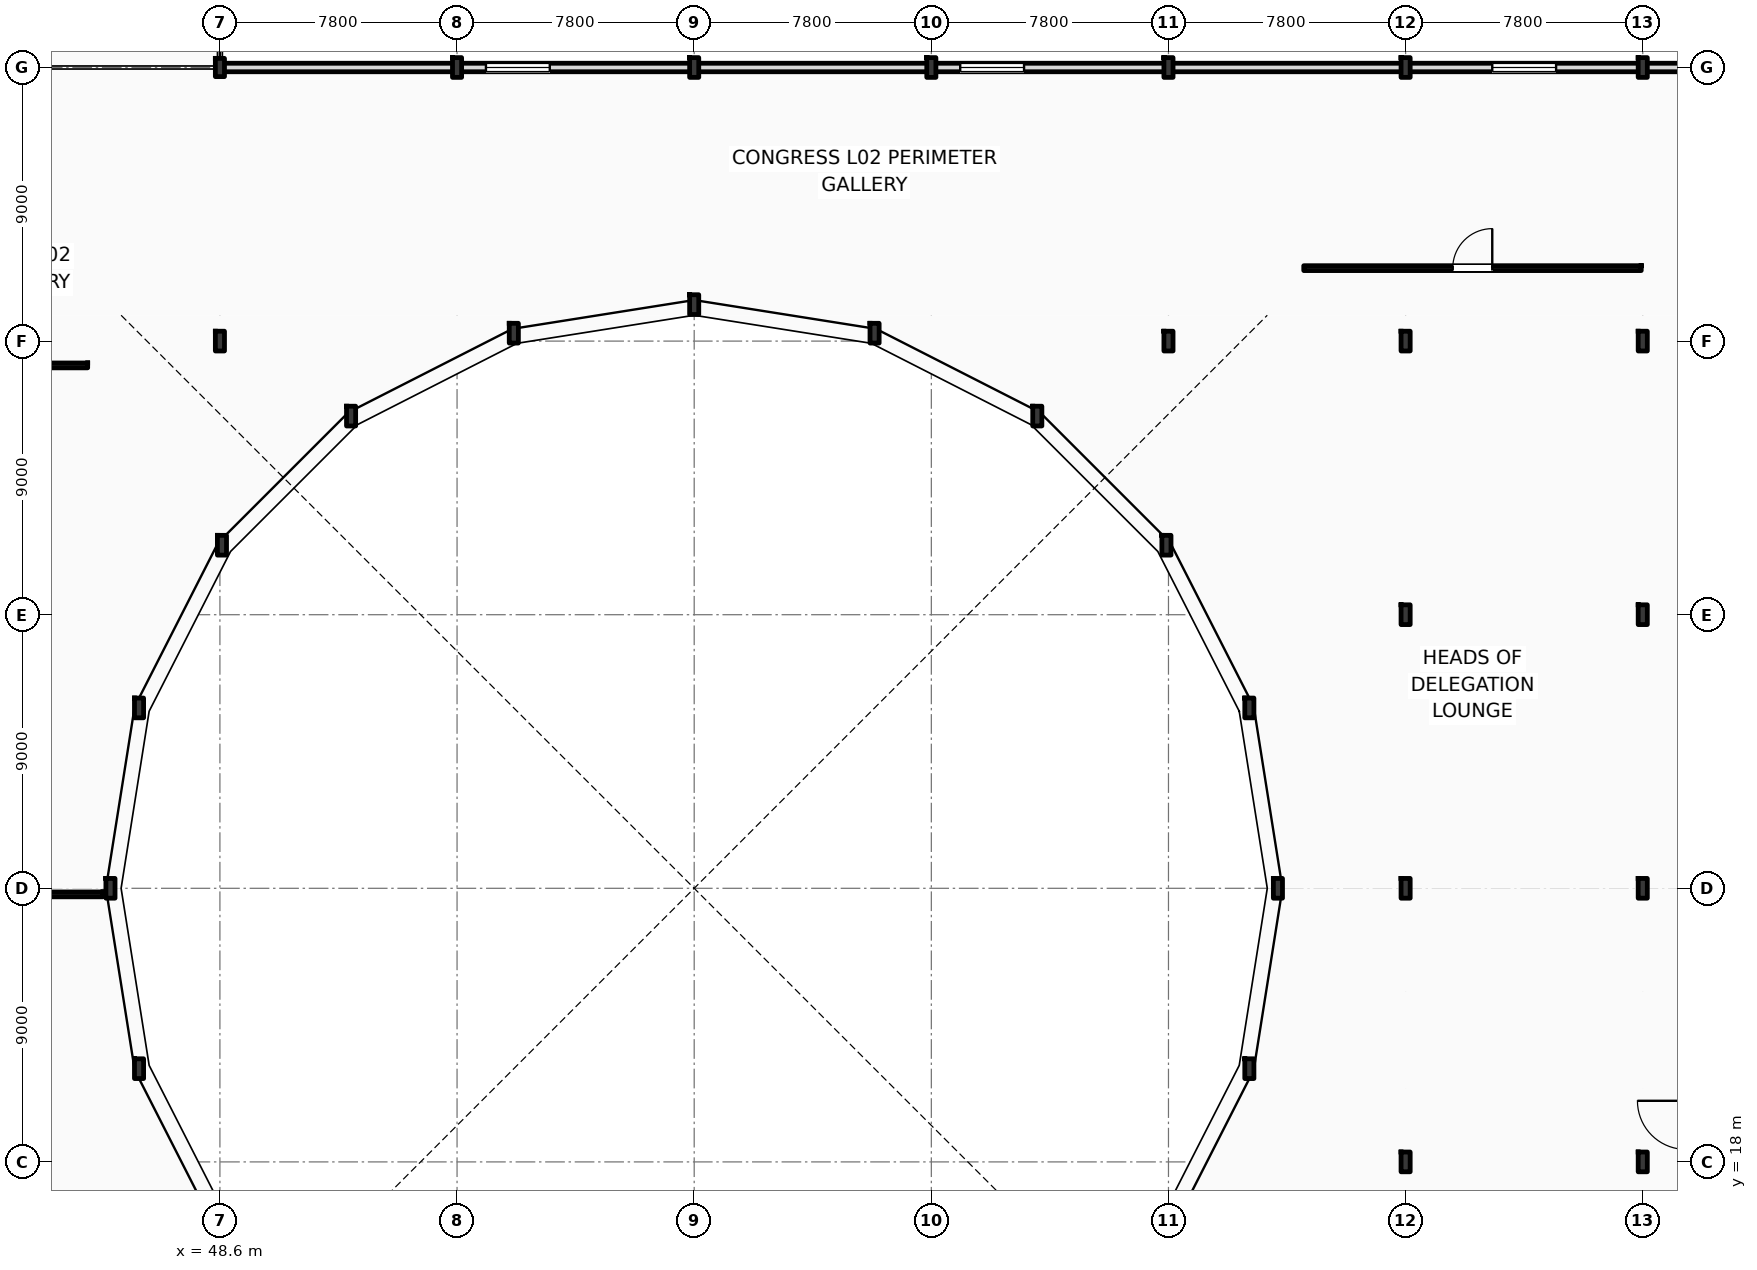
"""IFC4 building model, lengths in metres.
Left out: names, types, materials, properties, quantities, classifications, styles, units other than length and angle.
Written with IfcOpenShell. Run it as: python <this file> out.ifc"""

import sys

from ifc_helpers import new_model, si_unit, direction, frame, frame_2d, origin, origin_2d, place, context, subcontext, project, spatial, rectangle, i_section, extrude, element, fill, save


model = new_model("IFC4")
c1 = context("Model", 3, precision=1e-05, world=origin(), true_north=direction((0.0, 1.0)))
c2 = subcontext(c1, "Body", "Model", "MODEL_VIEW")
j1 = project(units=[si_unit("LENGTHUNIT", "METRE"), si_unit("PLANEANGLEUNIT", "RADIAN")], contexts=[c1])
p1 = place(None, origin())
s1 = spatial("IfcSite", under=j1, at=p1, CompositionType="ELEMENT")
p2 = place(p1, origin())
s2 = spatial("IfcBuilding", under=s1, at=p2, CompositionType="ELEMENT")
p3 = place(p2, frame((0.0, 0.0, 11.4)))
s3 = spatial("IfcBuildingStorey", under=s2, at=p3, CompositionType="ELEMENT", Elevation=11.4)
p4 = place(p3, frame((48.6, 54.0, 0.0), z_axis=(0.0, 0.0, 1.0), x_axis=(1.0, 0.0, 0.0)))
e1 = element("IfcColumn", 1, at=p4, inside=s3, PredefinedType="COLUMN", context=c2, shape_type="SweptSolid", body=[
    extrude(i_section(OverallWidth=0.3, OverallDepth=0.6, WebThickness=0.015, FlangeThickness=0.03, FilletRadius=0.027, at=origin_2d()), origin(), (0.0, 0.0, 1.0), 4.8),
])
for number, where, z_axis, x_axis in (
    (2, (48.6, 45.0, 0.0), (0.0, 0.0, 1.0), (1.0, 0.0, 0.0)),
    (3, (56.4, 54.0, 0.0), (0.0, 0.0, 1.0), (1.0, 0.0, 0.0)),
    (4, (64.2, 54.0, 0.0), (0.0, 0.0, 1.0), (1.0, 0.0, 0.0)),
    (5, (72.0, 54.0, 0.0), (0.0, 0.0, 1.0), (1.0, 0.0, 0.0)),
    (6, (79.8, 45.0, 0.0), (0.0, 0.0, 1.0), (1.0, 0.0, 0.0)),
    (7, (79.8, 54.0, 0.0), (0.0, 0.0, 1.0), (1.0, 0.0, 0.0)),
    (8, (87.6, 18.0, 0.0), (0.0, 0.0, 1.0), (1.0, 0.0, 0.0)),
    (9, (87.6, 27.0, 0.0), (0.0, 0.0, 1.0), (1.0, 0.0, 0.0)),
    (10, (87.6, 36.0, 0.0), (0.0, 0.0, 1.0), (1.0, 0.0, 0.0)),
    (11, (87.6, 45.0, 0.0), (0.0, 0.0, 1.0), (1.0, 0.0, 0.0)),
    (12, (87.6, 54.0, 0.0), (0.0, 0.0, 1.0), (1.0, 0.0, 0.0)),
    (13, (95.4, 18.0, 0.0), (0.0, 0.0, 1.0), (1.0, 0.0, 0.0)),
    (14, (95.4, 27.0, 0.0), (0.0, 0.0, 1.0), (1.0, 0.0, 0.0)),
    (15, (95.4, 36.0, 0.0), (0.0, 0.0, 1.0), (1.0, 0.0, 0.0)),
    (16, (95.4, 45.0, 0.0), (0.0, 0.0, 1.0), (1.0, 0.0, 0.0)),
    (17, (95.4, 54.0, 0.0), (0.0, 0.0, 1.0), (1.0, 0.0, 0.0)),
    (18, (83.4, 27.0, 0.0), (0.0, 0.0, 1.0), (1.0, 0.0, 0.0)),
    (19, (82.46, 32.933, 0.0), (0.0, 0.0, 1.0), (1.0, 0.0, 0.0)),
    (20, (79.733, 38.285, 0.0), (0.0, 0.0, 1.0), (1.0, 0.0, 0.0)),
    (21, (75.486, 42.533, 0.0), (0.0, 0.0, 1.0), (1.0, 0.0, 0.0)),
    (22, (70.133, 45.26, 0.0), (0.0, 0.0, 1.0), (1.0, 0.0, 0.0)),
    (23, (64.2, 46.2, 0.0), (0.0, 0.0, 1.0), (1.0, 0.0, 0.0)),
    (24, (58.267, 45.26, 0.0), (0.0, 0.0, 1.0), (1.0, 0.0, 0.0)),
    (25, (52.915, 42.533, 0.0), (0.0, 0.0, 1.0), (1.0, 0.0, 0.0)),
    (26, (48.667, 38.285, 0.0), (0.0, 0.0, 1.0), (1.0, 0.0, 0.0)),
    (27, (45.94, 32.933, 0.0), (0.0, 0.0, 1.0), (1.0, 0.0, 0.0)),
    (28, (45.0, 27.0, 0.0), (0.0, 0.0, 1.0), (1.0, 0.0, 0.0)),
    (29, (45.94, 21.067, 0.0), (0.0, 0.0, 1.0), (1.0, 0.0, 0.0)),
    (30, (82.46, 21.067, 0.0), (0.0, 0.0, 1.0), (1.0, 0.0, 0.0)),
):
    element("IfcColumn", number, at=place(p3, frame(where, z_axis=z_axis, x_axis=x_axis)), inside=s3, PredefinedType="COLUMN", context=c2, shape_type="SweptSolid", body=[
        extrude(i_section(OverallWidth=0.3, OverallDepth=0.65, WebThickness=0.016, FlangeThickness=0.031, FilletRadius=0.027, at=origin_2d()), origin(), (0.0, 0.0, 1.0), 4.8),
    ])
p5 = place(p3, frame((48.6, 54.0, 0.0), z_axis=(0.0, 0.0, 1.0), x_axis=(1.0, 0.0, 0.0)))
e31 = element("IfcWall", 31, at=p5, inside=s3, PredefinedType="STANDARD", context=c2, shape_type="SweptSolid", body=[
    extrude(rectangle(XDim=15.6, YDim=0.28, at=frame_2d((7.8, 0.0))), origin(), (0.0, 0.0, 1.0), 4.06),
])
p6 = place(p5, frame((8.75, 0.0, 1.05)))
e32 = element("IfcOpeningElement", 32, at=p6, cuts=e31, PredefinedType="OPENING", context=c2, shape_type="SweptSolid", body=[
    extrude(rectangle(XDim=2.1, YDim=2.2, at=frame_2d((1.05, 1.1))), frame((0.0, 0.15, 0.0), z_axis=(0.0, -1.0, 0.0), x_axis=(1.0, 0.0, 0.0)), (0.0, 0.0, 1.0), 0.3),
])
p7 = place(p3, frame((64.2, 54.0, 0.0), z_axis=(0.0, 0.0, 1.0), x_axis=(1.0, 0.0, 0.0)))
e33 = element("IfcWall", 33, at=p7, inside=s3, PredefinedType="STANDARD", context=c2, shape_type="SweptSolid", body=[
    extrude(rectangle(XDim=15.6, YDim=0.28, at=frame_2d((7.8, 0.0))), origin(), (0.0, 0.0, 1.0), 4.06),
])
p8 = place(p7, frame((8.75, 0.0, 1.05)))
e34 = element("IfcOpeningElement", 34, at=p8, cuts=e33, PredefinedType="OPENING", context=c2, shape_type="SweptSolid", body=[
    extrude(rectangle(XDim=2.1, YDim=2.2, at=frame_2d((1.05, 1.1))), frame((0.0, 0.15, 0.0), z_axis=(0.0, -1.0, 0.0), x_axis=(1.0, 0.0, 0.0)), (0.0, 0.0, 1.0), 0.3),
])
p9 = place(p3, frame((79.8, 54.0, 0.0), z_axis=(0.0, 0.0, 1.0), x_axis=(1.0, 0.0, 0.0)))
e35 = element("IfcWall", 35, at=p9, inside=s3, PredefinedType="STANDARD", context=c2, shape_type="SweptSolid", body=[
    extrude(rectangle(XDim=23.4, YDim=0.28, at=frame_2d((11.7, 0.0))), origin(), (0.0, 0.0, 1.0), 4.06),
])
p10 = place(p9, frame((10.65, 0.0, 1.05)))
e36 = element("IfcOpeningElement", 36, at=p10, cuts=e35, PredefinedType="OPENING", context=c2, shape_type="SweptSolid", body=[
    extrude(rectangle(XDim=2.1, YDim=2.2, at=frame_2d((1.05, 1.1))), frame((0.0, 0.15, 0.0), z_axis=(0.0, -1.0, 0.0), x_axis=(1.0, 0.0, 0.0)), (0.0, 0.0, 1.0), 0.3),
])
p11 = place(p3, frame((33.45, 26.8, 0.0), z_axis=(0.0, 0.0, 1.0), x_axis=(1.0, 0.0, 0.0)))
e37 = element("IfcWall", 37, at=p11, inside=s3, PredefinedType="PARTITIONING", context=c2, shape_type="SweptSolid", body=[
    extrude(rectangle(XDim=11.3, YDim=0.16, at=frame_2d((5.65, 0.0))), origin(), (0.0, 0.0, 1.0), 4.06),
])
p12 = place(p11, frame((4.75, 0.0, 0.0)))
e38 = element("IfcOpeningElement", 38, at=p12, cuts=e37, PredefinedType="OPENING", context=c2, shape_type="SweptSolid", body=[
    extrude(rectangle(XDim=1.3, YDim=2.2, at=frame_2d((0.65, 1.1))), frame((0.0, 0.09, 0.0), z_axis=(0.0, -1.0, 0.0), x_axis=(1.0, 0.0, 0.0)), (0.0, 0.0, 1.0), 0.18),
])
p13 = place(p3, frame((33.45, 44.2, 0.0), z_axis=(0.0, 0.0, 1.0), x_axis=(1.0, 0.0, 0.0)))
e39 = element("IfcWall", 39, at=p13, inside=s3, PredefinedType="PARTITIONING", context=c2, shape_type="SweptSolid", body=[
    extrude(rectangle(XDim=10.8, YDim=0.16, at=frame_2d((5.4, 0.0))), origin(), (0.0, 0.0, 1.0), 4.52),
])
p14 = place(p13, frame((4.75, 0.0, 0.0)))
e40 = element("IfcOpeningElement", 40, at=p14, cuts=e39, PredefinedType="OPENING", context=c2, shape_type="SweptSolid", body=[
    extrude(rectangle(XDim=1.3, YDim=2.2, at=frame_2d((0.65, 1.1))), frame((0.0, 0.09, 0.0), z_axis=(0.0, -1.0, 0.0), x_axis=(1.0, 0.0, 0.0)), (0.0, 0.0, 1.0), 0.18),
])
p15 = place(p3, frame((84.25, 47.4, 0.0), z_axis=(0.0, 0.0, 1.0), x_axis=(1.0, 0.0, 0.0)))
e41 = element("IfcWall", 41, at=p15, inside=s3, PredefinedType="PARTITIONING", context=c2, shape_type="SweptSolid", body=[
    extrude(rectangle(XDim=11.1, YDim=0.16, at=frame_2d((5.55, 0.0))), origin(), (0.0, 0.0, 1.0), 4.52),
])
p16 = place(p15, frame((4.9, 0.0, 0.0)))
e42 = element("IfcOpeningElement", 42, at=p16, cuts=e41, PredefinedType="OPENING", context=c2, shape_type="SweptSolid", body=[
    extrude(rectangle(XDim=1.3, YDim=2.2, at=frame_2d((0.65, 1.1))), frame((0.0, 0.09, 0.0), z_axis=(0.0, -1.0, 0.0), x_axis=(1.0, 0.0, 0.0)), (0.0, 0.0, 1.0), 0.18),
])
p17 = place(p6, origin())
e43 = element("IfcWindow", 43, at=p17, inside=s3, PartitioningType="DOUBLE_PANEL_VERTICAL", PredefinedType="WINDOW", context=c2, shape_type="SweptSolid", body=[
    extrude(rectangle(XDim=2.1, YDim=2.2, at=frame_2d((1.05, 1.1))), frame((0.0, 0.03, 0.0), z_axis=(0.0, -1.0, 0.0), x_axis=(1.0, 0.0, 0.0)), (0.0, 0.0, 1.0), 0.06),
])
fill(e32, e43)
p18 = place(p8, origin())
e44 = element("IfcWindow", 44, at=p18, inside=s3, PartitioningType="DOUBLE_PANEL_VERTICAL", PredefinedType="WINDOW", context=c2, shape_type="SweptSolid", body=[
    extrude(rectangle(XDim=2.1, YDim=2.2, at=frame_2d((1.05, 1.1))), frame((0.0, 0.03, 0.0), z_axis=(0.0, -1.0, 0.0), x_axis=(1.0, 0.0, 0.0)), (0.0, 0.0, 1.0), 0.06),
])
fill(e34, e44)
p19 = place(p10, origin())
e45 = element("IfcWindow", 45, at=p19, inside=s3, PartitioningType="DOUBLE_PANEL_VERTICAL", PredefinedType="WINDOW", context=c2, shape_type="SweptSolid", body=[
    extrude(rectangle(XDim=2.1, YDim=2.2, at=frame_2d((1.05, 1.1))), frame((0.0, 0.03, 0.0), z_axis=(0.0, -1.0, 0.0), x_axis=(1.0, 0.0, 0.0)), (0.0, 0.0, 1.0), 0.06),
])
fill(e36, e45)
p20 = place(p16, origin())
e46 = element("IfcDoor", 46, at=p20, inside=s3, OperationType="SINGLE_SWING_RIGHT", PredefinedType="DOOR", context=c2, shape_type="SweptSolid", body=[
    extrude(rectangle(XDim=1.3, YDim=2.2, at=frame_2d((0.65, 1.1))), frame((0.0, 0.025, 0.0), z_axis=(0.0, -1.0, 0.0), x_axis=(1.0, 0.0, 0.0)), (0.0, 0.0, 1.0), 0.05),
])
fill(e42, e46)
save(model, sys.argv[1])
